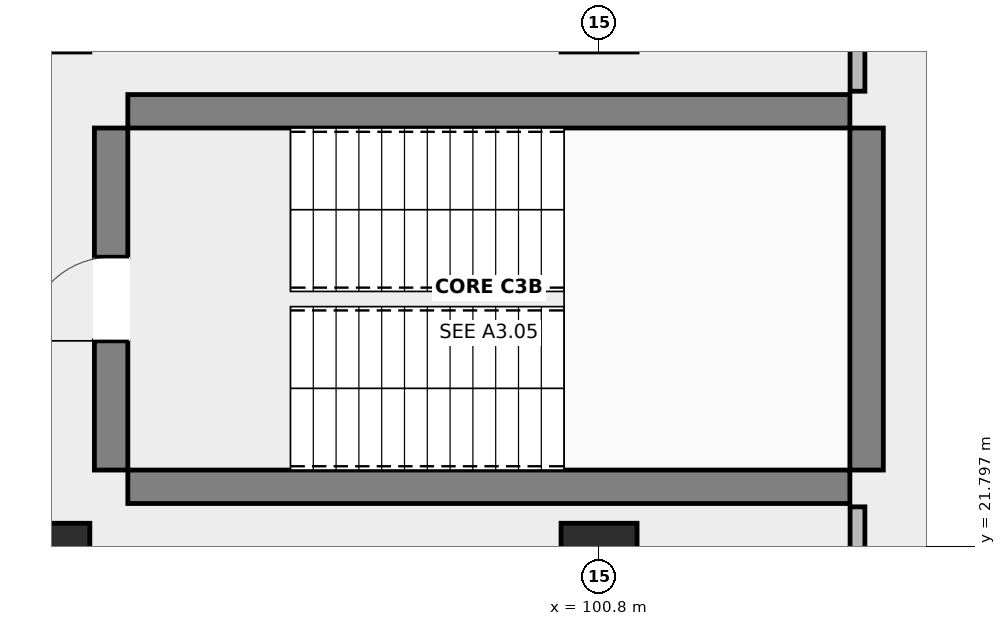
"""IFC4 building model, lengths in metres.
Left out: names, types, materials, properties, quantities, classifications, styles, units other than length and angle.
Written with IfcOpenShell. Run it as: python <this file> out.ifc"""

import sys

from ifc_helpers import new_model, si_unit, direction, frame, frame_2d, origin, origin_2d, place, context, subcontext, project, spatial, rectangle, extrude, element, fill, save


model = new_model("IFC4")
c1 = context("Model", 3, precision=1e-05, world=origin(), true_north=direction((0.0, 1.0)))
c2 = subcontext(c1, "Body", "Model", "MODEL_VIEW")
j1 = project(units=[si_unit("LENGTHUNIT", "METRE"), si_unit("PLANEANGLEUNIT", "RADIAN")], contexts=[c1])
p1 = place(None, origin())
s1 = spatial("IfcSite", under=j1, at=p1, CompositionType="ELEMENT")
p2 = place(p1, origin())
s2 = spatial("IfcBuilding", under=s1, at=p2, CompositionType="ELEMENT")
p3 = place(p2, frame((0.0, 0.0, -4.5)))
s3 = spatial("IfcBuildingStorey", under=s2, at=p3, CompositionType="ELEMENT", Elevation=-4.5)
for number, where, z_axis, x_axis in (
    (1, (93.6, 21.6, 0.0), (0.0, 0.0, 1.0), (1.0, 0.0, 0.0)),
    (2, (100.8, 21.6, 0.0), (0.0, 0.0, 1.0), (1.0, 0.0, 0.0)),
):
    element("IfcColumn", number, at=place(p3, frame(where, z_axis=z_axis, x_axis=x_axis)), inside=s3, PredefinedType="COLUMN", context=c2, shape_type="SweptSolid", body=[
        extrude(rectangle(XDim=1.0, YDim=1.0, at=origin_2d()), origin(), (0.0, 0.0, 1.0), 4.15),
    ])
for number, where, z_axis, x_axis in (
    (3, (94.6, 22.58, 0.0), (0.0, 0.0, 1.0), (1.0, 0.0, 0.0)),
    (4, (94.6, 27.52, 0.0), (0.0, 0.0, 1.0), (1.0, 0.0, 0.0)),
):
    element("IfcWall", number, at=place(p3, frame(where, z_axis=z_axis, x_axis=x_axis)), inside=s3, PredefinedType="SHEAR", context=c2, shape_type="SweptSolid", body=[
        extrude(rectangle(XDim=9.5, YDim=0.44, at=frame_2d((4.75, 0.0))), origin(), (0.0, 0.0, 1.0), 4.15),
    ])
p4 = place(p3, frame((94.38, 22.8, 0.0), z_axis=(0.0, 0.0, 1.0), x_axis=(0.0, 1.0, 0.0)))
e5 = element("IfcWall", 5, at=p4, inside=s3, PredefinedType="SHEAR", context=c2, shape_type="SweptSolid", body=[
    extrude(rectangle(XDim=4.5, YDim=0.44, at=frame_2d((2.25, 0.0))), origin(), (0.0, 0.0, 1.0), 4.15),
])
p5 = place(p4, frame((1.7, 0.0, 0.0)))
e6 = element("IfcOpeningElement", 6, at=p5, cuts=e5, PredefinedType="OPENING", context=c2, shape_type="SweptSolid", body=[
    extrude(rectangle(XDim=1.1, YDim=2.15, at=frame_2d((0.55, 1.075))), frame((0.0, 0.23, 0.0), z_axis=(0.0, -1.0, 0.0), x_axis=(1.0, 0.0, 0.0)), (0.0, 0.0, 1.0), 0.46),
])
p6 = place(p3, frame((104.32, 22.8, 0.0), z_axis=(0.0, 0.0, 1.0), x_axis=(0.0, 1.0, 0.0)))
e7 = element("IfcWall", 7, at=p6, inside=s3, PredefinedType="SHEAR", context=c2, shape_type="SweptSolid", body=[
    extrude(rectangle(XDim=4.5, YDim=0.44, at=frame_2d((2.25, 0.0))), origin(), (0.0, 0.0, 1.0), 4.15),
])
p7 = place(p3, frame((104.2, 14.71, 0.0), z_axis=(0.0, 0.0, 1.0), x_axis=(0.0, 1.0, 0.0)))
e8 = element("IfcWall", 8, at=p7, inside=s3, PredefinedType="PARTITIONING", context=c2, shape_type="SweptSolid", body=[
    extrude(rectangle(XDim=7.606, YDim=0.195, at=frame_2d((3.803, 0.0))), origin(), (0.0, 0.0, 1.0), 3.19),
])
p8 = place(p3, frame((104.2, 27.784, 0.0), z_axis=(0.0, 0.0, 1.0), x_axis=(0.0, 1.0, 0.0)))
e9 = element("IfcWall", 9, at=p8, inside=s3, PredefinedType="PARTITIONING", context=c2, shape_type="SweptSolid", body=[
    extrude(rectangle(XDim=2.396, YDim=0.195, at=frame_2d((1.198, 0.0))), origin(), (0.0, 0.0, 1.0), 3.19),
])
p9 = place(p5, origin())
e10 = element("IfcDoor", 10, at=p9, inside=s3, OperationType="SINGLE_SWING_LEFT", PredefinedType="DOOR", context=c2, shape_type="SweptSolid", body=[
    extrude(rectangle(XDim=1.1, YDim=2.15, at=frame_2d((0.55, 1.075))), frame((0.0, 0.025, 0.0), z_axis=(0.0, -1.0, 0.0), x_axis=(1.0, 0.0, 0.0)), (0.0, 0.0, 1.0), 0.05),
])
fill(e6, e10)
save(model, sys.argv[1])
